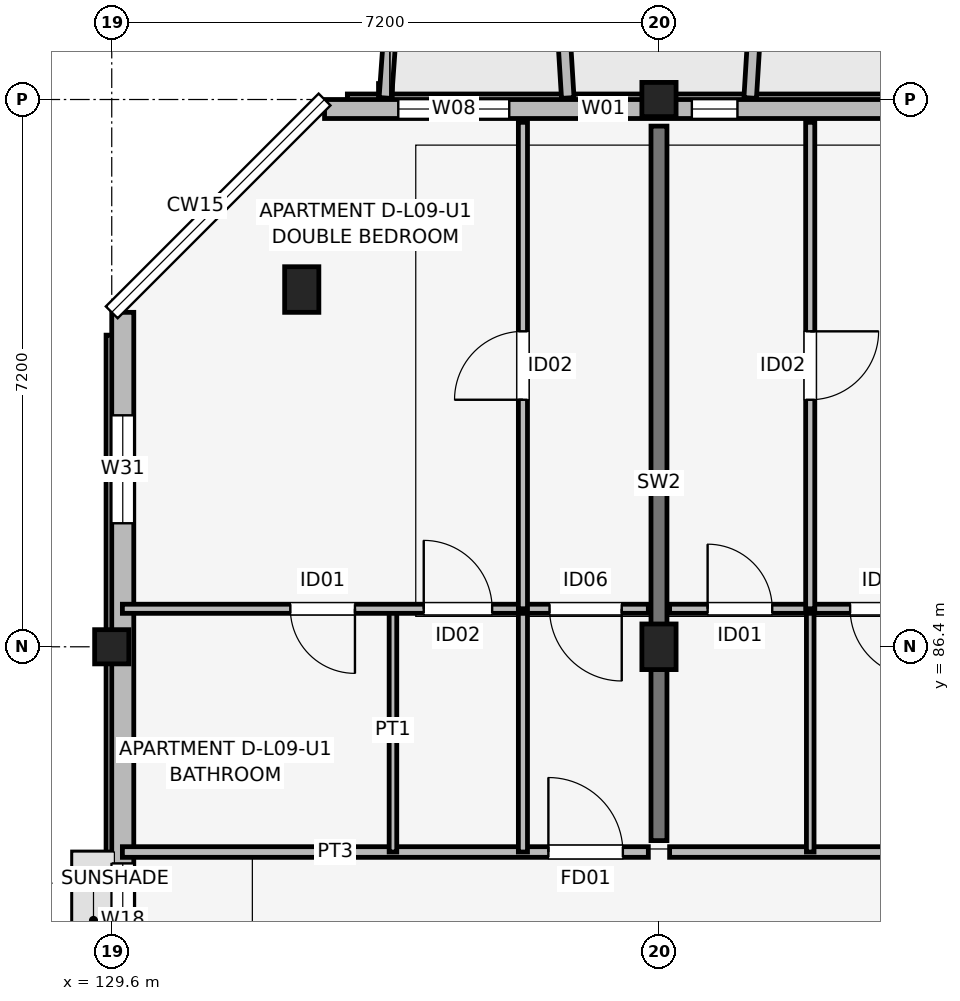
"""IFC4 building model, lengths in metres.
Left out: names, types, materials, properties, quantities, classifications, styles, units other than length and angle.
Written with IfcOpenShell. Run it as: python <this file> out.ifc"""

import sys

from ifc_helpers import new_model, si_unit, direction, frame, frame_2d, origin, origin_2d, place, context, subcontext, project, spatial, rectangle, extrude, element, fill, save


model = new_model("IFC4")
c1 = context("Model", 3, precision=1e-05, world=origin(), true_north=direction((0.0, 1.0)))
c2 = subcontext(c1, "Body", "Model", "MODEL_VIEW")
j1 = project(units=[si_unit("LENGTHUNIT", "METRE"), si_unit("PLANEANGLEUNIT", "RADIAN")], contexts=[c1])
p1 = place(None, origin())
s1 = spatial("IfcSite", under=j1, at=p1, CompositionType="ELEMENT")
p2 = place(p1, origin())
s2 = spatial("IfcBuilding", under=s1, at=p2, CompositionType="ELEMENT")
p3 = place(p2, frame((0.0, 0.0, 30.75)))
s3 = spatial("IfcBuildingStorey", under=s2, at=p3, CompositionType="ELEMENT", Elevation=30.75)
p4 = place(p3, frame((129.6, 86.4, 0.0), z_axis=(0.0, 0.0, 1.0), x_axis=(1.0, 0.0, 0.0)))
e1 = element("IfcColumn", 1, at=p4, inside=s3, PredefinedType="COLUMN", context=c2, shape_type="SweptSolid", body=[
    extrude(rectangle(XDim=0.45, YDim=0.45, at=origin_2d()), origin(), (0.0, 0.0, 1.0), 3.15),
])
for number, where, z_axis, x_axis in (
    (2, (132.1, 91.1, 0.0), (0.0, 0.0, 1.0), (1.0, 0.0, 0.0)),
    (3, (136.8, 86.4, 0.0), (0.0, 0.0, 1.0), (1.0, 0.0, 0.0)),
):
    element("IfcColumn", number, at=place(p3, frame(where, z_axis=z_axis, x_axis=x_axis)), inside=s3, PredefinedType="COLUMN", context=c2, shape_type="SweptSolid", body=[
        extrude(rectangle(XDim=0.45, YDim=0.6, at=origin_2d()), origin(), (0.0, 0.0, 1.0), 3.15),
    ])
p5 = place(p3, frame((136.8, 93.6, 0.0), z_axis=(0.0, 0.0, 1.0), x_axis=(1.0, 0.0, 0.0)))
e4 = element("IfcColumn", 4, at=p5, inside=s3, PredefinedType="COLUMN", context=c2, shape_type="SweptSolid", body=[
    extrude(rectangle(XDim=0.45, YDim=0.45, at=origin_2d()), origin(), (0.0, 0.0, 1.0), 3.15),
])
p6 = place(p3, frame((136.8, 83.85, 0.0), z_axis=(0.0, 0.0, 1.0), x_axis=(0.0, 1.0, 0.0)))
e5 = element("IfcWall", 5, at=p6, inside=s3, PredefinedType="SHEAR", context=c2, shape_type="SweptSolid", body=[
    extrude(rectangle(XDim=9.4, YDim=0.21, at=frame_2d((4.7, 0.0))), origin(), (0.0, 0.0, 1.0), 3.15),
])
p7 = place(p3, frame((162.8, 93.475, 0.0), z_axis=(0.0, 0.0, 1.0), x_axis=(-1.0, 0.0, 0.0)))
e6 = element("IfcWall", 6, at=p7, inside=s3, PredefinedType="SOLIDWALL", context=c2, shape_type="SweptSolid", body=[
    extrude(rectangle(XDim=30.4, YDim=0.25, at=frame_2d((15.2, 0.0))), origin(), (0.0, 0.0, 1.0), 2.48),
])
p8 = place(p7, frame((22.1, 0.0, 0.0), z_axis=(0.0, 0.0, 1.0), x_axis=(-1.0, 0.0, 0.0)))
e7 = element("IfcOpeningElement", 7, at=p8, cuts=e6, PredefinedType="OPENING", context=c2, shape_type="SweptSolid", body=[
    extrude(rectangle(XDim=1.8, YDim=2.15, at=frame_2d((0.9, 1.075))), frame((0.0, 0.135, 0.0), z_axis=(0.0, -1.0, 0.0), x_axis=(1.0, 0.0, 0.0)), (0.0, 0.0, 1.0), 0.27),
])
p9 = place(p7, frame((7.625, 0.0, 0.0), z_axis=(0.0, 0.0, 1.0), x_axis=(-1.0, 0.0, 0.0)))
e8 = element("IfcOpeningElement", 8, at=p9, cuts=e6, PredefinedType="OPENING", context=c2, shape_type="SweptSolid", body=[
    extrude(rectangle(XDim=1.65, YDim=2.15, at=frame_2d((0.825, 1.075))), frame((0.0, 0.135, 0.0), z_axis=(0.0, -1.0, 0.0), x_axis=(1.0, 0.0, 0.0)), (0.0, 0.0, 1.0), 0.27),
])
p10 = place(p7, frame((27.97, 0.0, 0.7)))
e9 = element("IfcOpeningElement", 9, at=p10, cuts=e6, PredefinedType="OPENING", context=c2, shape_type="SweptSolid", body=[
    extrude(rectangle(XDim=1.46, YDim=1.55, at=frame_2d((0.73, 0.775))), frame((0.0, 0.135, 0.0), z_axis=(0.0, -1.0, 0.0), x_axis=(1.0, 0.0, 0.0)), (0.0, 0.0, 1.0), 0.27),
])
p11 = place(p7, frame((26.433, 0.0, 0.75)))
e10 = element("IfcOpeningElement", 10, at=p11, cuts=e6, PredefinedType="OPENING", context=c2, shape_type="SweptSolid", body=[
    extrude(rectangle(XDim=0.6, YDim=1.25, at=frame_2d((0.3, 0.625))), frame((0.0, 0.135, 0.0), z_axis=(0.0, -1.0, 0.0), x_axis=(1.0, 0.0, 0.0)), (0.0, 0.0, 1.0), 0.27),
])
p12 = place(p7, frame((24.968, 0.0, 0.75)))
e11 = element("IfcOpeningElement", 11, at=p12, cuts=e6, PredefinedType="OPENING", context=c2, shape_type="SweptSolid", body=[
    extrude(rectangle(XDim=0.6, YDim=1.25, at=frame_2d((0.3, 0.625))), frame((0.0, 0.135, 0.0), z_axis=(0.0, -1.0, 0.0), x_axis=(1.0, 0.0, 0.0)), (0.0, 0.0, 1.0), 0.27),
])
p13 = place(p7, frame((15.61, 0.0, 0.7)))
e12 = element("IfcOpeningElement", 12, at=p13, cuts=e6, PredefinedType="OPENING", context=c2, shape_type="SweptSolid", body=[
    extrude(rectangle(XDim=1.58, YDim=1.6, at=frame_2d((0.79, 0.8))), frame((0.0, 0.135, 0.0), z_axis=(0.0, -1.0, 0.0), x_axis=(1.0, 0.0, 0.0)), (0.0, 0.0, 1.0), 0.27),
])
p14 = place(p7, frame((12.945, 0.0, 0.75)))
e13 = element("IfcOpeningElement", 13, at=p14, cuts=e6, PredefinedType="OPENING", context=c2, shape_type="SweptSolid", body=[
    extrude(rectangle(XDim=1.46, YDim=1.55, at=frame_2d((0.73, 0.775))), frame((0.0, 0.135, 0.0), z_axis=(0.0, -1.0, 0.0), x_axis=(1.0, 0.0, 0.0)), (0.0, 0.0, 1.0), 0.27),
])
p15 = place(p7, frame((10.567, 0.0, 0.75)))
e14 = element("IfcOpeningElement", 14, at=p15, cuts=e6, PredefinedType="OPENING", context=c2, shape_type="SweptSolid", body=[
    extrude(rectangle(XDim=0.6, YDim=1.25, at=frame_2d((0.3, 0.625))), frame((0.0, 0.135, 0.0), z_axis=(0.0, -1.0, 0.0), x_axis=(1.0, 0.0, 0.0)), (0.0, 0.0, 1.0), 0.27),
])
p16 = place(p7, frame((3.367, 0.0, 0.75)))
e15 = element("IfcOpeningElement", 15, at=p16, cuts=e6, PredefinedType="OPENING", context=c2, shape_type="SweptSolid", body=[
    extrude(rectangle(XDim=0.6, YDim=1.25, at=frame_2d((0.3, 0.625))), frame((0.0, 0.135, 0.0), z_axis=(0.0, -1.0, 0.0), x_axis=(1.0, 0.0, 0.0)), (0.0, 0.0, 1.0), 0.27),
])
p17 = place(p7, frame((1.175, 0.0, 0.75)))
e16 = element("IfcOpeningElement", 16, at=p17, cuts=e6, PredefinedType="OPENING", context=c2, shape_type="SweptSolid", body=[
    extrude(rectangle(XDim=0.85, YDim=1.4, at=frame_2d((0.425, 0.7))), frame((0.0, 0.135, 0.0), z_axis=(0.0, -1.0, 0.0), x_axis=(1.0, 0.0, 0.0)), (0.0, 0.0, 1.0), 0.27),
])
p18 = place(p3, frame((129.745, 90.8, 0.0), z_axis=(0.0, 0.0, 1.0), x_axis=(0.0, -1.0, 0.0)))
e17 = element("IfcWall", 17, at=p18, inside=s3, PredefinedType="SOLIDWALL", context=c2, shape_type="SweptSolid", body=[
    extrude(rectangle(XDim=16.0, YDim=0.29, at=frame_2d((8.0, 0.0))), origin(), (0.0, 0.0, 1.0), 2.48),
])
p19 = place(p18, frame((7.25, 0.0, 1.05)))
e18 = element("IfcOpeningElement", 18, at=p19, cuts=e17, PredefinedType="OPENING", context=c2, shape_type="SweptSolid", body=[
    extrude(rectangle(XDim=1.5, YDim=1.15, at=frame_2d((0.75, 0.575))), frame((0.0, 0.155, 0.0), z_axis=(0.0, -1.0, 0.0), x_axis=(1.0, 0.0, 0.0)), (0.0, 0.0, 1.0), 0.31),
])
p20 = place(p18, frame((1.355, 0.0, 0.75)))
e19 = element("IfcOpeningElement", 19, at=p20, cuts=e17, PredefinedType="OPENING", context=c2, shape_type="SweptSolid", body=[
    extrude(rectangle(XDim=1.42, YDim=1.6, at=frame_2d((0.71, 0.8))), frame((0.0, 0.155, 0.0), z_axis=(0.0, -1.0, 0.0), x_axis=(1.0, 0.0, 0.0)), (0.0, 0.0, 1.0), 0.31),
])
p21 = place(p3, frame((133.2, 93.62, 0.0), z_axis=(0.0, 0.0, 1.0), x_axis=(0.071317687608, 0.997453651772, 0.0)))
e20 = element("IfcWall", 20, at=p21, inside=s3, PredefinedType="ELEMENTEDWALL", context=c2, shape_type="SweptSolid", body=[
    extrude(rectangle(XDim=1.965, YDim=0.165, at=frame_2d((0.982, 0.0))), origin(), (0.0, 0.0, 1.0), 2.95),
])
p22 = place(p3, frame((135.6, 93.62, 0.0), z_axis=(0.0, 0.0, 1.0), x_axis=(-0.061170732449, 0.998127317276, 0.0)))
e21 = element("IfcWall", 21, at=p22, inside=s3, PredefinedType="ELEMENTEDWALL", context=c2, shape_type="SweptSolid", body=[
    extrude(rectangle(XDim=1.964, YDim=0.165, at=frame_2d((0.982, 0.0))), origin(), (0.0, 0.0, 1.0), 2.95),
])
p23 = place(p3, frame((138.0, 93.62, 0.0), z_axis=(0.0, 0.0, 1.0), x_axis=(0.061170732449, 0.998127317276, 0.0)))
e22 = element("IfcWall", 22, at=p23, inside=s3, PredefinedType="ELEMENTEDWALL", context=c2, shape_type="SweptSolid", body=[
    extrude(rectangle(XDim=1.964, YDim=0.165, at=frame_2d((0.982, 0.0))), origin(), (0.0, 0.0, 1.0), 2.48),
])
p24 = place(p3, frame((129.74, 83.7, 0.0), z_axis=(0.0, 0.0, 1.0), x_axis=(1.0, 0.0, 0.0)))
e23 = element("IfcWall", 23, at=p24, inside=s3, PredefinedType="PARTITIONING", context=c2, shape_type="SweptSolid", body=[
    extrude(rectangle(XDim=6.92, YDim=0.14, at=frame_2d((3.46, 0.0))), origin(), (0.0, 0.0, 1.0), 2.38),
])
p25 = place(p24, frame((5.605, 0.0, 0.0)))
e24 = element("IfcOpeningElement", 24, at=p25, cuts=e23, PredefinedType="OPENING", context=c2, shape_type="SweptSolid", body=[
    extrude(rectangle(XDim=0.98, YDim=2.1, at=frame_2d((0.49, 1.05))), frame((0.0, 0.08, 0.0), z_axis=(0.0, -1.0, 0.0), x_axis=(1.0, 0.0, 0.0)), (0.0, 0.0, 1.0), 0.16),
])
p26 = place(p3, frame((133.3, 83.7, 0.0), z_axis=(0.0, 0.0, 1.0), x_axis=(0.0, 1.0, 0.0)))
e25 = element("IfcWall", 25, at=p26, inside=s3, PredefinedType="PARTITIONING", context=c2, shape_type="SweptSolid", body=[
    extrude(rectangle(XDim=3.2, YDim=0.1, at=frame_2d((1.6, 0.0))), origin(), (0.0, 0.0, 1.0), 2.38),
])
p27 = place(p3, frame((135.01, 83.7, 0.0), z_axis=(0.0, 0.0, 1.0), x_axis=(0.0, 1.0, 0.0)))
e26 = element("IfcWall", 26, at=p27, inside=s3, PredefinedType="PARTITIONING", context=c2, shape_type="SweptSolid", body=[
    extrude(rectangle(XDim=3.2, YDim=0.12, at=frame_2d((1.6, 0.0))), origin(), (0.0, 0.0, 1.0), 2.38),
])
p28 = place(p3, frame((129.74, 86.9, 0.0), z_axis=(0.0, 0.0, 1.0), x_axis=(1.0, 0.0, 0.0)))
e27 = element("IfcWall", 27, at=p28, inside=s3, PredefinedType="PARTITIONING", context=c2, shape_type="SweptSolid", body=[
    extrude(rectangle(XDim=6.92, YDim=0.12, at=frame_2d((3.46, 0.0))), origin(), (0.0, 0.0, 1.0), 2.38),
])
p29 = place(p28, frame((3.06, 0.0, 0.0), z_axis=(0.0, 0.0, 1.0), x_axis=(-1.0, 0.0, 0.0)))
e28 = element("IfcOpeningElement", 28, at=p29, cuts=e27, PredefinedType="OPENING", context=c2, shape_type="SweptSolid", body=[
    extrude(rectangle(XDim=0.85, YDim=2.08, at=frame_2d((0.425, 1.04))), frame((0.0, 0.07, 0.0), z_axis=(0.0, -1.0, 0.0), x_axis=(1.0, 0.0, 0.0)), (0.0, 0.0, 1.0), 0.14),
])
p30 = place(p28, frame((3.965, 0.0, 0.0)))
e29 = element("IfcOpeningElement", 29, at=p30, cuts=e27, PredefinedType="OPENING", context=c2, shape_type="SweptSolid", body=[
    extrude(rectangle(XDim=0.9, YDim=2.08, at=frame_2d((0.45, 1.04))), frame((0.0, 0.07, 0.0), z_axis=(0.0, -1.0, 0.0), x_axis=(1.0, 0.0, 0.0)), (0.0, 0.0, 1.0), 0.14),
])
p31 = place(p28, frame((6.57, 0.0, 0.0), z_axis=(0.0, 0.0, 1.0), x_axis=(-1.0, 0.0, 0.0)))
e30 = element("IfcOpeningElement", 30, at=p31, cuts=e27, PredefinedType="OPENING", context=c2, shape_type="SweptSolid", body=[
    extrude(rectangle(XDim=0.95, YDim=2.08, at=frame_2d((0.475, 1.04))), frame((0.0, 0.07, 0.0), z_axis=(0.0, -1.0, 0.0), x_axis=(1.0, 0.0, 0.0)), (0.0, 0.0, 1.0), 0.14),
])
p32 = place(p3, frame((135.01, 86.9, 0.0), z_axis=(0.0, 0.0, 1.0), x_axis=(0.0, 1.0, 0.0)))
e31 = element("IfcWall", 31, at=p32, inside=s3, PredefinedType="PARTITIONING", context=c2, shape_type="SweptSolid", body=[
    extrude(rectangle(XDim=6.4, YDim=0.12, at=frame_2d((3.2, 0.0))), origin(), (0.0, 0.0, 1.0), 2.38),
])
p33 = place(p32, frame((2.75, 0.0, 0.0)))
e32 = element("IfcOpeningElement", 32, at=p33, cuts=e31, PredefinedType="OPENING", context=c2, shape_type="SweptSolid", body=[
    extrude(rectangle(XDim=0.9, YDim=2.08, at=frame_2d((0.45, 1.04))), frame((0.0, 0.07, 0.0), z_axis=(0.0, -1.0, 0.0), x_axis=(1.0, 0.0, 0.0)), (0.0, 0.0, 1.0), 0.14),
])
p34 = place(p3, frame((136.94, 83.7, 0.0), z_axis=(0.0, 0.0, 1.0), x_axis=(1.0, 0.0, 0.0)))
e33 = element("IfcWall", 33, at=p34, inside=s3, PredefinedType="PARTITIONING", context=c2, shape_type="SweptSolid", body=[
    extrude(rectangle(XDim=6.92, YDim=0.14, at=frame_2d((3.46, 0.0))), origin(), (0.0, 0.0, 1.0), 2.38),
])
p35 = place(p34, frame((5.85, 0.0, 0.0), z_axis=(0.0, 0.0, 1.0), x_axis=(-1.0, 0.0, 0.0)))
e34 = element("IfcOpeningElement", 34, at=p35, cuts=e33, PredefinedType="OPENING", context=c2, shape_type="SweptSolid", body=[
    extrude(rectangle(XDim=0.98, YDim=2.1, at=frame_2d((0.49, 1.05))), frame((0.0, 0.08, 0.0), z_axis=(0.0, -1.0, 0.0), x_axis=(1.0, 0.0, 0.0)), (0.0, 0.0, 1.0), 0.16),
])
p36 = place(p3, frame((138.79, 83.7, 0.0), z_axis=(0.0, 0.0, 1.0), x_axis=(0.0, 1.0, 0.0)))
e35 = element("IfcWall", 35, at=p36, inside=s3, PredefinedType="PARTITIONING", context=c2, shape_type="SweptSolid", body=[
    extrude(rectangle(XDim=3.2, YDim=0.1, at=frame_2d((1.6, 0.0))), origin(), (0.0, 0.0, 1.0), 2.38),
])
p37 = place(p3, frame((136.94, 86.9, 0.0), z_axis=(0.0, 0.0, 1.0), x_axis=(1.0, 0.0, 0.0)))
e36 = element("IfcWall", 36, at=p37, inside=s3, PredefinedType="PARTITIONING", context=c2, shape_type="SweptSolid", body=[
    extrude(rectangle(XDim=6.92, YDim=0.12, at=frame_2d((3.46, 0.0))), origin(), (0.0, 0.0, 1.0), 2.38),
])
p38 = place(p37, frame((0.5, 0.0, 0.0)))
e37 = element("IfcOpeningElement", 37, at=p38, cuts=e36, PredefinedType="OPENING", context=c2, shape_type="SweptSolid", body=[
    extrude(rectangle(XDim=0.85, YDim=2.08, at=frame_2d((0.425, 1.04))), frame((0.0, 0.07, 0.0), z_axis=(0.0, -1.0, 0.0), x_axis=(1.0, 0.0, 0.0)), (0.0, 0.0, 1.0), 0.14),
])
p39 = place(p37, frame((3.275, 0.0, 0.0), z_axis=(0.0, 0.0, 1.0), x_axis=(-1.0, 0.0, 0.0)))
e38 = element("IfcOpeningElement", 38, at=p39, cuts=e36, PredefinedType="OPENING", context=c2, shape_type="SweptSolid", body=[
    extrude(rectangle(XDim=0.9, YDim=2.08, at=frame_2d((0.45, 1.04))), frame((0.0, 0.07, 0.0), z_axis=(0.0, -1.0, 0.0), x_axis=(1.0, 0.0, 0.0)), (0.0, 0.0, 1.0), 0.14),
])
p40 = place(p37, frame((4.885, 0.0, 0.0)))
e39 = element("IfcOpeningElement", 39, at=p40, cuts=e36, PredefinedType="OPENING", context=c2, shape_type="SweptSolid", body=[
    extrude(rectangle(XDim=0.95, YDim=2.08, at=frame_2d((0.475, 1.04))), frame((0.0, 0.07, 0.0), z_axis=(0.0, -1.0, 0.0), x_axis=(1.0, 0.0, 0.0)), (0.0, 0.0, 1.0), 0.14),
])
p41 = place(p3, frame((138.79, 86.9, 0.0), z_axis=(0.0, 0.0, 1.0), x_axis=(0.0, 1.0, 0.0)))
e40 = element("IfcWall", 40, at=p41, inside=s3, PredefinedType="PARTITIONING", context=c2, shape_type="SweptSolid", body=[
    extrude(rectangle(XDim=6.4, YDim=0.12, at=frame_2d((3.2, 0.0))), origin(), (0.0, 0.0, 1.0), 2.38),
])
p42 = place(p41, frame((3.65, 0.0, 0.0), z_axis=(0.0, 0.0, 1.0), x_axis=(-1.0, 0.0, 0.0)))
e41 = element("IfcOpeningElement", 41, at=p42, cuts=e40, PredefinedType="OPENING", context=c2, shape_type="SweptSolid", body=[
    extrude(rectangle(XDim=0.9, YDim=2.08, at=frame_2d((0.45, 1.04))), frame((0.0, 0.07, 0.0), z_axis=(0.0, -1.0, 0.0), x_axis=(1.0, 0.0, 0.0)), (0.0, 0.0, 1.0), 0.14),
])
p43 = place(p10, origin())
e42 = element("IfcWindow", 42, at=p43, inside=s3, PartitioningType="SINGLE_PANEL", PredefinedType="WINDOW", context=c2, shape_type="SweptSolid", body=[
    extrude(rectangle(XDim=1.46, YDim=1.55, at=frame_2d((0.73, 0.775))), frame((0.0, 0.03, 0.0), z_axis=(0.0, -1.0, 0.0), x_axis=(1.0, 0.0, 0.0)), (0.0, 0.0, 1.0), 0.06),
])
fill(e9, e42)
p44 = place(p11, origin())
e43 = element("IfcWindow", 43, at=p44, inside=s3, PartitioningType="SINGLE_PANEL", PredefinedType="WINDOW", context=c2, shape_type="SweptSolid", body=[
    extrude(rectangle(XDim=0.6, YDim=1.25, at=frame_2d((0.3, 0.625))), frame((0.0, 0.03, 0.0), z_axis=(0.0, -1.0, 0.0), x_axis=(1.0, 0.0, 0.0)), (0.0, 0.0, 1.0), 0.06),
])
fill(e10, e43)
p45 = place(p12, origin())
e44 = element("IfcWindow", 44, at=p45, inside=s3, PartitioningType="SINGLE_PANEL", PredefinedType="WINDOW", context=c2, shape_type="SweptSolid", body=[
    extrude(rectangle(XDim=0.6, YDim=1.25, at=frame_2d((0.3, 0.625))), frame((0.0, 0.03, 0.0), z_axis=(0.0, -1.0, 0.0), x_axis=(1.0, 0.0, 0.0)), (0.0, 0.0, 1.0), 0.06),
])
fill(e11, e44)
p46 = place(p19, origin())
e45 = element("IfcWindow", 45, at=p46, inside=s3, PartitioningType="SINGLE_PANEL", PredefinedType="WINDOW", context=c2, shape_type="SweptSolid", body=[
    extrude(rectangle(XDim=1.5, YDim=1.15, at=frame_2d((0.75, 0.575))), frame((0.0, 0.03, 0.0), z_axis=(0.0, -1.0, 0.0), x_axis=(1.0, 0.0, 0.0)), (0.0, 0.0, 1.0), 0.06),
])
fill(e18, e45)
p47 = place(p20, origin())
e46 = element("IfcWindow", 46, at=p47, inside=s3, PartitioningType="SINGLE_PANEL", PredefinedType="WINDOW", context=c2, shape_type="SweptSolid", body=[
    extrude(rectangle(XDim=1.42, YDim=1.6, at=frame_2d((0.71, 0.8))), frame((0.0, 0.03, 0.0), z_axis=(0.0, -1.0, 0.0), x_axis=(1.0, 0.0, 0.0)), (0.0, 0.0, 1.0), 0.06),
])
fill(e19, e46)
p48 = place(p25, origin())
e47 = element("IfcDoor", 47, at=p48, inside=s3, OperationType="SINGLE_SWING_LEFT", PredefinedType="DOOR", context=c2, shape_type="SweptSolid", body=[
    extrude(rectangle(XDim=0.98, YDim=2.1, at=frame_2d((0.49, 1.05))), frame((0.0, 0.025, 0.0), z_axis=(0.0, -1.0, 0.0), x_axis=(1.0, 0.0, 0.0)), (0.0, 0.0, 1.0), 0.05),
])
fill(e24, e47)
p49 = place(p29, origin())
e48 = element("IfcDoor", 48, at=p49, inside=s3, OperationType="SINGLE_SWING_RIGHT", PredefinedType="DOOR", context=c2, shape_type="SweptSolid", body=[
    extrude(rectangle(XDim=0.85, YDim=2.08, at=frame_2d((0.425, 1.04))), frame((0.0, 0.025, 0.0), z_axis=(0.0, -1.0, 0.0), x_axis=(1.0, 0.0, 0.0)), (0.0, 0.0, 1.0), 0.05),
])
fill(e28, e48)
p50 = place(p30, origin())
e49 = element("IfcDoor", 49, at=p50, inside=s3, OperationType="SINGLE_SWING_LEFT", PredefinedType="DOOR", context=c2, shape_type="SweptSolid", body=[
    extrude(rectangle(XDim=0.9, YDim=2.08, at=frame_2d((0.45, 1.04))), frame((0.0, 0.025, 0.0), z_axis=(0.0, -1.0, 0.0), x_axis=(1.0, 0.0, 0.0)), (0.0, 0.0, 1.0), 0.05),
])
fill(e29, e49)
p51 = place(p31, origin())
e50 = element("IfcDoor", 50, at=p51, inside=s3, OperationType="SINGLE_SWING_RIGHT", PredefinedType="DOOR", context=c2, shape_type="SweptSolid", body=[
    extrude(rectangle(XDim=0.95, YDim=2.08, at=frame_2d((0.475, 1.04))), frame((0.0, 0.025, 0.0), z_axis=(0.0, -1.0, 0.0), x_axis=(1.0, 0.0, 0.0)), (0.0, 0.0, 1.0), 0.05),
])
fill(e30, e50)
p52 = place(p33, origin())
e51 = element("IfcDoor", 51, at=p52, inside=s3, OperationType="SINGLE_SWING_LEFT", PredefinedType="DOOR", context=c2, shape_type="SweptSolid", body=[
    extrude(rectangle(XDim=0.9, YDim=2.08, at=frame_2d((0.45, 1.04))), frame((0.0, 0.025, 0.0), z_axis=(0.0, -1.0, 0.0), x_axis=(1.0, 0.0, 0.0)), (0.0, 0.0, 1.0), 0.05),
])
fill(e32, e51)
p53 = place(p38, origin())
e52 = element("IfcDoor", 52, at=p53, inside=s3, OperationType="SINGLE_SWING_LEFT", PredefinedType="DOOR", context=c2, shape_type="SweptSolid", body=[
    extrude(rectangle(XDim=0.85, YDim=2.08, at=frame_2d((0.425, 1.04))), frame((0.0, 0.025, 0.0), z_axis=(0.0, -1.0, 0.0), x_axis=(1.0, 0.0, 0.0)), (0.0, 0.0, 1.0), 0.05),
])
fill(e37, e52)
p54 = place(p39, origin())
e53 = element("IfcDoor", 53, at=p54, inside=s3, OperationType="SINGLE_SWING_RIGHT", PredefinedType="DOOR", context=c2, shape_type="SweptSolid", body=[
    extrude(rectangle(XDim=0.9, YDim=2.08, at=frame_2d((0.45, 1.04))), frame((0.0, 0.025, 0.0), z_axis=(0.0, -1.0, 0.0), x_axis=(1.0, 0.0, 0.0)), (0.0, 0.0, 1.0), 0.05),
])
fill(e38, e53)
p55 = place(p42, origin())
e54 = element("IfcDoor", 54, at=p55, inside=s3, OperationType="SINGLE_SWING_RIGHT", PredefinedType="DOOR", context=c2, shape_type="SweptSolid", body=[
    extrude(rectangle(XDim=0.9, YDim=2.08, at=frame_2d((0.45, 1.04))), frame((0.0, 0.025, 0.0), z_axis=(0.0, -1.0, 0.0), x_axis=(1.0, 0.0, 0.0)), (0.0, 0.0, 1.0), 0.05),
])
fill(e41, e54)
save(model, sys.argv[1])
